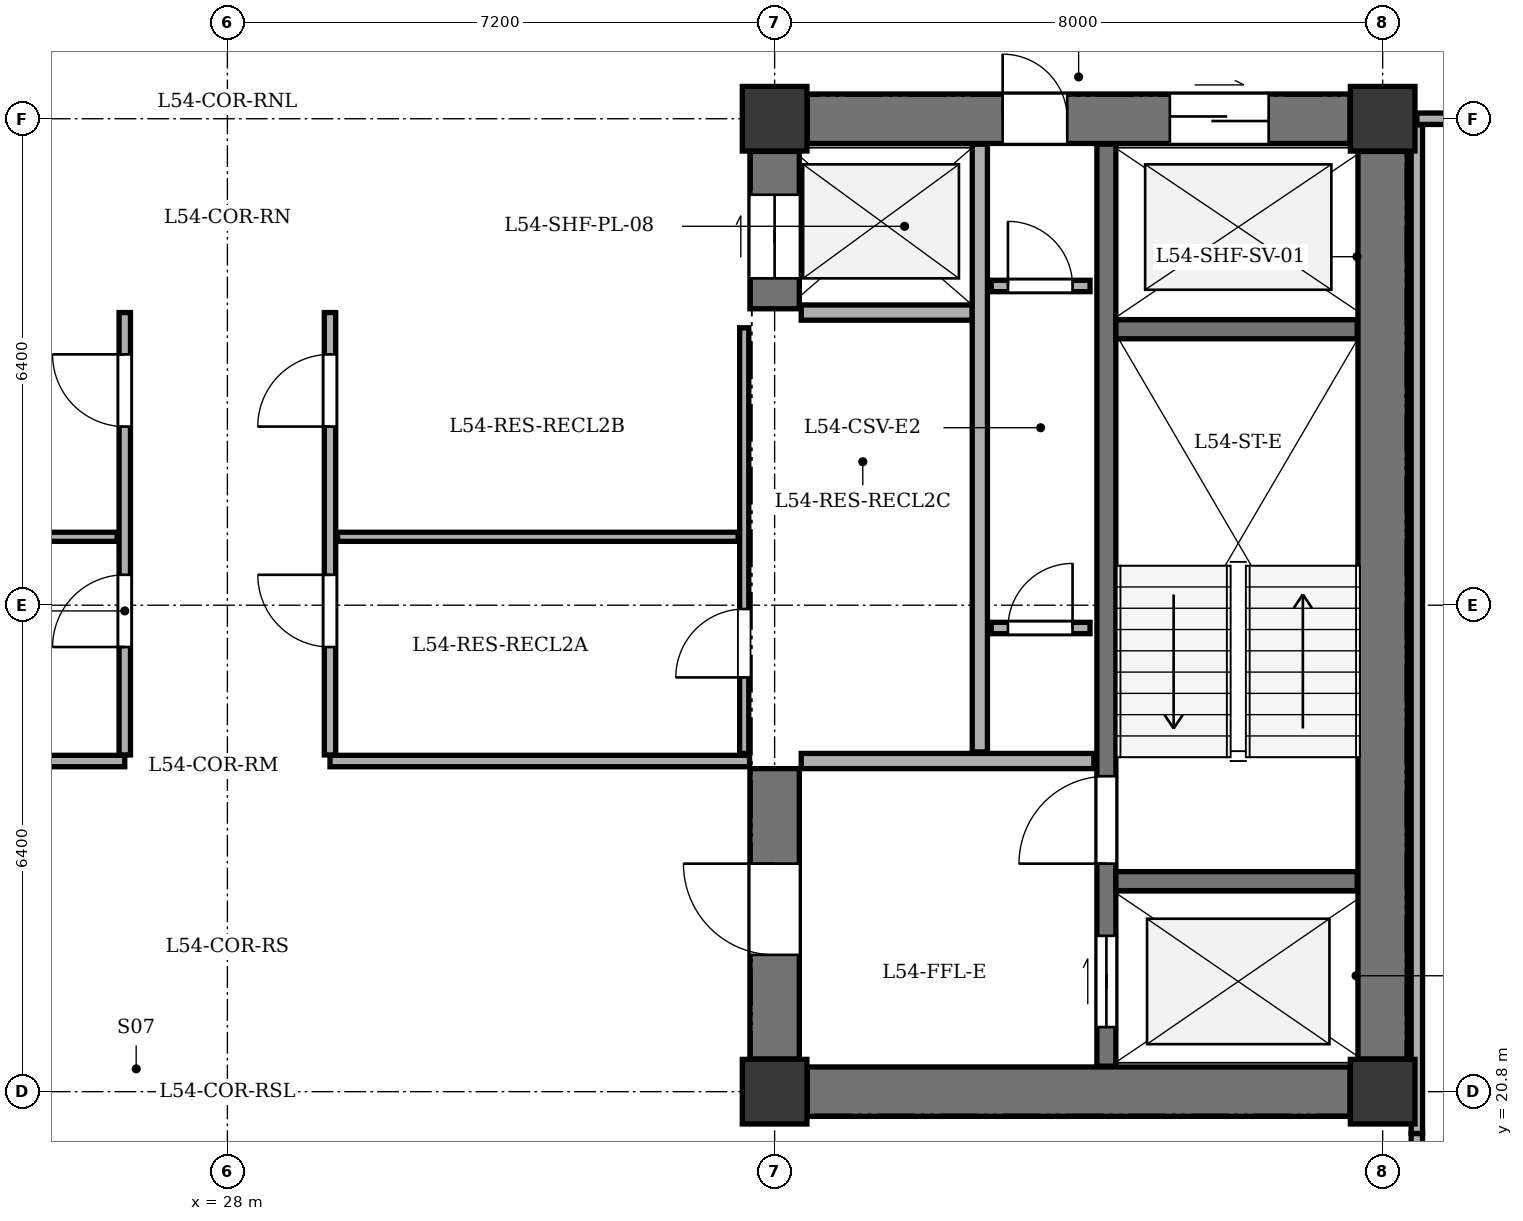
"""IFC4 building model, lengths in metres.
Left out: names, types, materials, properties, quantities, classifications, styles, units other than length and angle.
Written with IfcOpenShell. Run it as: python <this file> out.ifc"""

import sys

from ifc_helpers import new_model, si_unit, direction, frame, frame_2d, origin, origin_2d, place, context, subcontext, project, spatial, rectangle, extrude, element, fill, save


model = new_model("IFC4")
c1 = context("Model", 3, precision=1e-05, world=origin(), true_north=direction((0.0, 1.0)))
c2 = subcontext(c1, "Body", "Model", "MODEL_VIEW")
j1 = project(units=[si_unit("LENGTHUNIT", "METRE"), si_unit("PLANEANGLEUNIT", "RADIAN")], contexts=[c1])
p1 = place(None, origin())
s1 = spatial("IfcSite", under=j1, at=p1, CompositionType="ELEMENT")
p2 = place(p1, origin())
s2 = spatial("IfcBuilding", under=s1, at=p2, CompositionType="ELEMENT")
p3 = place(p2, frame((0.0, 0.0, 210.9)))
s3 = spatial("IfcBuildingStorey", under=s2, at=p3, CompositionType="ELEMENT", Elevation=210.9)
for number, where, z_axis, x_axis in (
    (1, (35.2, 20.8, 0.0), (0.0, 0.0, 1.0), (1.0, 0.0, 0.0)),
    (2, (43.2, 20.8, 0.0), (0.0, 0.0, 1.0), (1.0, 0.0, 0.0)),
    (3, (35.2, 33.6, 0.0), (0.0, 0.0, 1.0), (1.0, 0.0, 0.0)),
    (4, (43.2, 33.6, 0.0), (0.0, 0.0, 1.0), (1.0, 0.0, 0.0)),
):
    element("IfcColumn", number, at=place(p3, frame(where, z_axis=z_axis, x_axis=x_axis)), inside=s3, PredefinedType="COLUMN", context=c2, shape_type="SweptSolid", body=[
        extrude(rectangle(XDim=0.85, YDim=0.85, at=origin_2d()), origin(), (0.0, 0.0, 1.0), 3.4),
    ])
p4 = place(p3, frame((43.2, 21.23, 0.0), z_axis=(0.0, 0.0, 1.0), x_axis=(0.0, 1.0, 0.0)))
e5 = element("IfcWall", 5, at=p4, inside=s3, PredefinedType="SHEAR", context=c2, shape_type="SweptSolid", body=[
    extrude(rectangle(XDim=11.94, YDim=0.65, at=frame_2d((5.97, 0.0))), origin(), (0.0, 0.0, 1.0), 3.1),
])
p5 = place(p3, frame((35.63, 20.8, 0.0), z_axis=(0.0, 0.0, 1.0), x_axis=(1.0, 0.0, 0.0)))
e6 = element("IfcWall", 6, at=p5, inside=s3, PredefinedType="SHEAR", context=c2, shape_type="SweptSolid", body=[
    extrude(rectangle(XDim=7.14, YDim=0.65, at=frame_2d((3.57, 0.0))), origin(), (0.0, 0.0, 1.0), 3.1),
])
p6 = place(p3, frame((35.63, 33.6, 0.0), z_axis=(0.0, 0.0, 1.0), x_axis=(1.0, 0.0, 0.0)))
e7 = element("IfcWall", 7, at=p6, inside=s3, PredefinedType="SHEAR", context=c2, shape_type="SweptSolid", body=[
    extrude(rectangle(XDim=7.14, YDim=0.65, at=frame_2d((3.57, 0.0))), origin(), (0.0, 0.0, 1.0), 3.1),
])
p7 = place(p6, frame((4.77, 0.0, 0.0)))
e8 = element("IfcOpeningElement", 8, at=p7, cuts=e7, PredefinedType="OPENING", context=c2, shape_type="SweptSolid", body=[
    extrude(rectangle(XDim=1.3, YDim=2.15, at=frame_2d((0.65, 1.075))), frame((0.0, 0.335, 0.0), z_axis=(0.0, -1.0, 0.0), x_axis=(1.0, 0.0, 0.0)), (0.0, 0.0, 1.0), 0.67),
])
p8 = place(p6, frame((2.57, 0.0, 0.0)))
e9 = element("IfcOpeningElement", 9, at=p8, cuts=e7, PredefinedType="OPENING", context=c2, shape_type="SweptSolid", body=[
    extrude(rectangle(XDim=0.85, YDim=2.02, at=frame_2d((0.425, 1.01))), frame((0.0, 0.335, 0.0), z_axis=(0.0, -1.0, 0.0), x_axis=(1.0, 0.0, 0.0)), (0.0, 0.0, 1.0), 0.67),
])
p9 = place(p3, frame((35.2, 21.23, 0.0), z_axis=(0.0, 0.0, 1.0), x_axis=(0.0, 1.0, 0.0)))
e10 = element("IfcWall", 10, at=p9, inside=s3, PredefinedType="SHEAR", context=c2, shape_type="SweptSolid", body=[
    extrude(rectangle(XDim=3.82, YDim=0.65, at=frame_2d((1.91, 0.0))), origin(), (0.0, 0.0, 1.0), 3.1),
])
p10 = place(p9, frame((1.37, 0.0, 0.0)))
e11 = element("IfcOpeningElement", 11, at=p10, cuts=e10, PredefinedType="OPENING", context=c2, shape_type="SweptSolid", body=[
    extrude(rectangle(XDim=1.2, YDim=2.15, at=frame_2d((0.6, 1.075))), frame((0.0, 0.335, 0.0), z_axis=(0.0, -1.0, 0.0), x_axis=(1.0, 0.0, 0.0)), (0.0, 0.0, 1.0), 0.67),
])
p11 = place(p3, frame((35.2, 31.1, 0.0), z_axis=(0.0, 0.0, 1.0), x_axis=(0.0, 1.0, 0.0)))
e12 = element("IfcWall", 12, at=p11, inside=s3, PredefinedType="SHEAR", context=c2, shape_type="SweptSolid", body=[
    extrude(rectangle(XDim=2.07, YDim=0.65, at=frame_2d((1.035, 0.0))), origin(), (0.0, 0.0, 1.0), 3.1),
])
p12 = place(p11, frame((0.4, 0.0, 0.0)))
e13 = element("IfcOpeningElement", 13, at=p12, cuts=e12, PredefinedType="OPENING", context=c2, shape_type="SweptSolid", body=[
    extrude(rectangle(XDim=1.1, YDim=2.1, at=frame_2d((0.55, 1.05))), frame((0.0, 0.335, 0.0), z_axis=(0.0, -1.0, 0.0), x_axis=(1.0, 0.0, 0.0)), (0.0, 0.0, 1.0), 0.67),
])
p13 = place(p3, frame((39.565, 21.135, 0.0), z_axis=(0.0, 0.0, 1.0), x_axis=(0.0, 1.0, 0.0)))
e14 = element("IfcWall", 14, at=p13, inside=s3, PredefinedType="SHEAR", context=c2, shape_type="SweptSolid", body=[
    extrude(rectangle(XDim=12.13, YDim=0.25, at=frame_2d((6.065, 0.0))), origin(), (0.0, 0.0, 1.0), 3.1),
])
p14 = place(p13, frame((0.515, 0.0, 0.0)))
e15 = element("IfcOpeningElement", 15, at=p14, cuts=e14, PredefinedType="OPENING", context=c2, shape_type="SweptSolid", body=[
    extrude(rectangle(XDim=1.2, YDim=2.15, at=frame_2d((0.6, 1.075))), frame((0.0, 0.135, 0.0), z_axis=(0.0, -1.0, 0.0), x_axis=(1.0, 0.0, 0.0)), (0.0, 0.0, 1.0), 0.27),
])
p15 = place(p13, frame((2.665, 0.0, 0.0)))
e16 = element("IfcOpeningElement", 16, at=p15, cuts=e14, PredefinedType="OPENING", context=c2, shape_type="SweptSolid", body=[
    extrude(rectangle(XDim=1.15, YDim=2.15, at=frame_2d((0.575, 1.075))), frame((0.0, 0.135, 0.0), z_axis=(0.0, -1.0, 0.0), x_axis=(1.0, 0.0, 0.0)), (0.0, 0.0, 1.0), 0.27),
])
for number, where, z_axis, x_axis in (
    (17, (39.69, 23.57, 0.0), (0.0, 0.0, 1.0), (1.0, 0.0, 0.0)),
    (18, (39.69, 30.83, 0.0), (0.0, 0.0, 1.0), (1.0, 0.0, 0.0)),
):
    element("IfcWall", number, at=place(p3, frame(where, z_axis=z_axis, x_axis=x_axis)), inside=s3, PredefinedType="SHEAR", context=c2, shape_type="SweptSolid", body=[
        extrude(rectangle(XDim=3.175, YDim=0.25, at=frame_2d((1.587, 0.0))), origin(), (0.0, 0.0, 1.0), 3.1),
    ])
p16 = place(p3, frame((35.55, 25.15, 0.0), z_axis=(0.0, 0.0, 1.0), x_axis=(1.0, 0.0, 0.0)))
e19 = element("IfcWall", 19, at=p16, inside=s3, PredefinedType="SOLIDWALL", context=c2, shape_type="SweptSolid", body=[
    extrude(rectangle(XDim=3.85, YDim=0.2, at=frame_2d((1.925, 0.0))), origin(), (0.0, 0.0, 1.0), 3.1),
])
p17 = place(p3, frame((35.55, 31.05, 0.0), z_axis=(0.0, 0.0, 1.0), x_axis=(1.0, 0.0, 0.0)))
e20 = element("IfcWall", 20, at=p17, inside=s3, PredefinedType="SOLIDWALL", context=c2, shape_type="SweptSolid", body=[
    extrude(rectangle(XDim=2.25, YDim=0.2, at=frame_2d((1.125, 0.0))), origin(), (0.0, 0.0, 1.0), 3.1),
])
p18 = place(p3, frame((37.9, 25.27, 0.0), z_axis=(0.0, 0.0, 1.0), x_axis=(0.0, 1.0, 0.0)))
e21 = element("IfcWall", 21, at=p18, inside=s3, PredefinedType="SOLIDWALL", context=c2, shape_type="SweptSolid", body=[
    extrude(rectangle(XDim=7.995, YDim=0.2, at=frame_2d((3.998, 0.0))), origin(), (0.0, 0.0, 1.0), 3.1),
])
p19 = place(p3, frame((38.05, 26.9, 0.0), z_axis=(0.0, 0.0, 1.0), x_axis=(1.0, 0.0, 0.0)))
e22 = element("IfcWall", 22, at=p19, inside=s3, PredefinedType="PARTITIONING", context=c2, shape_type="SweptSolid", body=[
    extrude(rectangle(XDim=1.3, YDim=0.15, at=frame_2d((0.65, 0.0))), origin(), (0.0, 0.0, 1.0), 3.1),
])
p20 = place(p19, frame((0.22, 0.0, 0.0)))
e23 = element("IfcOpeningElement", 23, at=p20, cuts=e22, PredefinedType="OPENING", context=c2, shape_type="SweptSolid", body=[
    extrude(rectangle(XDim=0.85, YDim=2.02, at=frame_2d((0.425, 1.01))), frame((0.0, 0.085, 0.0), z_axis=(0.0, -1.0, 0.0), x_axis=(1.0, 0.0, 0.0)), (0.0, 0.0, 1.0), 0.17),
])
p21 = place(p3, frame((38.05, 31.4, 0.0), z_axis=(0.0, 0.0, 1.0), x_axis=(1.0, 0.0, 0.0)))
e24 = element("IfcWall", 24, at=p21, inside=s3, PredefinedType="PARTITIONING", context=c2, shape_type="SweptSolid", body=[
    extrude(rectangle(XDim=1.3, YDim=0.15, at=frame_2d((0.65, 0.0))), origin(), (0.0, 0.0, 1.0), 3.1),
])
p22 = place(p21, frame((0.22, 0.0, 0.0)))
e25 = element("IfcOpeningElement", 25, at=p22, cuts=e24, PredefinedType="OPENING", context=c2, shape_type="SweptSolid", body=[
    extrude(rectangle(XDim=0.85, YDim=2.02, at=frame_2d((0.425, 1.01))), frame((0.0, 0.085, 0.0), z_axis=(0.0, -1.0, 0.0), x_axis=(1.0, 0.0, 0.0)), (0.0, 0.0, 1.0), 0.17),
])
for number, where, z_axis, x_axis in (
    (26, (21.13, 25.15, 0.0), (0.0, 0.0, 1.0), (1.0, 0.0, 0.0)),
    (27, (29.35, 25.15, 0.0), (0.0, 0.0, 1.0), (1.0, 0.0, 0.0)),
):
    element("IfcWall", number, at=place(p3, frame(where, z_axis=z_axis, x_axis=x_axis)), inside=s3, PredefinedType="PARTITIONING", context=c2, shape_type="SweptSolid", body=[
        extrude(rectangle(XDim=5.52, YDim=0.15, at=frame_2d((2.76, 0.0))), origin(), (0.0, 0.0, 1.0), 3.1),
    ])
p23 = place(p3, frame((26.65, 25.23, 0.0), z_axis=(0.0, 0.0, 1.0), x_axis=(0.0, 1.0, 0.0)))
e28 = element("IfcWall", 28, at=p23, inside=s3, PredefinedType="PARTITIONING", context=c2, shape_type="SweptSolid", body=[
    extrude(rectangle(XDim=5.82, YDim=0.15, at=frame_2d((2.91, 0.0))), origin(), (0.0, 0.0, 1.0), 3.1),
])
p24 = place(p23, frame((1.42, 0.0, 0.0)))
e29 = element("IfcOpeningElement", 29, at=p24, cuts=e28, PredefinedType="OPENING", context=c2, shape_type="SweptSolid", body=[
    extrude(rectangle(XDim=0.95, YDim=2.1, at=frame_2d((0.475, 1.05))), frame((0.0, 0.085, 0.0), z_axis=(0.0, -1.0, 0.0), x_axis=(1.0, 0.0, 0.0)), (0.0, 0.0, 1.0), 0.17),
])
p25 = place(p23, frame((4.32, 0.0, 0.0)))
e30 = element("IfcOpeningElement", 30, at=p25, cuts=e28, PredefinedType="OPENING", context=c2, shape_type="SweptSolid", body=[
    extrude(rectangle(XDim=0.95, YDim=2.1, at=frame_2d((0.475, 1.05))), frame((0.0, 0.085, 0.0), z_axis=(0.0, -1.0, 0.0), x_axis=(1.0, 0.0, 0.0)), (0.0, 0.0, 1.0), 0.17),
])
p26 = place(p3, frame((20.28, 28.1, 0.0), z_axis=(0.0, 0.0, 1.0), x_axis=(1.0, 0.0, 0.0)))
e31 = element("IfcWall", 31, at=p26, inside=s3, PredefinedType="PARTITIONING", context=c2, shape_type="SweptSolid", body=[
    extrude(rectangle(XDim=6.27, YDim=0.12, at=frame_2d((3.135, 0.0))), origin(), (0.0, 0.0, 1.0), 3.1),
])
p27 = place(p3, frame((29.35, 25.23, 0.0), z_axis=(0.0, 0.0, 1.0), x_axis=(0.0, 1.0, 0.0)))
e32 = element("IfcWall", 32, at=p27, inside=s3, PredefinedType="PARTITIONING", context=c2, shape_type="SweptSolid", body=[
    extrude(rectangle(XDim=5.82, YDim=0.15, at=frame_2d((2.91, 0.0))), origin(), (0.0, 0.0, 1.0), 3.1),
])
p28 = place(p27, frame((1.42, 0.0, 0.0)))
e33 = element("IfcOpeningElement", 33, at=p28, cuts=e32, PredefinedType="OPENING", context=c2, shape_type="SweptSolid", body=[
    extrude(rectangle(XDim=0.95, YDim=2.1, at=frame_2d((0.475, 1.05))), frame((0.0, 0.085, 0.0), z_axis=(0.0, -1.0, 0.0), x_axis=(1.0, 0.0, 0.0)), (0.0, 0.0, 1.0), 0.17),
])
p29 = place(p27, frame((4.32, 0.0, 0.0)))
e34 = element("IfcOpeningElement", 34, at=p29, cuts=e32, PredefinedType="OPENING", context=c2, shape_type="SweptSolid", body=[
    extrude(rectangle(XDim=0.95, YDim=2.1, at=frame_2d((0.475, 1.05))), frame((0.0, 0.085, 0.0), z_axis=(0.0, -1.0, 0.0), x_axis=(1.0, 0.0, 0.0)), (0.0, 0.0, 1.0), 0.17),
])
p30 = place(p3, frame((34.8, 25.25, 0.0), z_axis=(0.0, 0.0, 1.0), x_axis=(0.0, 1.0, 0.0)))
e35 = element("IfcWall", 35, at=p30, inside=s3, PredefinedType="PARTITIONING", context=c2, shape_type="SweptSolid", body=[
    extrude(rectangle(XDim=5.6, YDim=0.12, at=frame_2d((2.8, 0.0))), origin(), (0.0, 0.0, 1.0), 3.1),
])
p31 = place(p30, frame((1.0, 0.0, 0.0)))
e36 = element("IfcOpeningElement", 36, at=p31, cuts=e35, PredefinedType="OPENING", context=c2, shape_type="SweptSolid", body=[
    extrude(rectangle(XDim=0.9, YDim=2.05, at=frame_2d((0.45, 1.025))), frame((0.0, 0.07, 0.0), z_axis=(0.0, -1.0, 0.0), x_axis=(1.0, 0.0, 0.0)), (0.0, 0.0, 1.0), 0.14),
])
p32 = place(p3, frame((29.45, 28.1, 0.0), z_axis=(0.0, 0.0, 1.0), x_axis=(1.0, 0.0, 0.0)))
e37 = element("IfcWall", 37, at=p32, inside=s3, PredefinedType="PARTITIONING", context=c2, shape_type="SweptSolid", body=[
    extrude(rectangle(XDim=5.27, YDim=0.12, at=frame_2d((2.635, 0.0))), origin(), (0.0, 0.0, 1.0), 3.1),
])
p33 = place(p3, frame((43.65, 33.6, 0.0), z_axis=(0.0, 0.0, 1.0), x_axis=(1.0, 0.0, 0.0)))
e38 = element("IfcWall", 38, at=p33, inside=s3, PredefinedType="PARTITIONING", context=c2, shape_type="SweptSolid", body=[
    extrude(rectangle(XDim=5.305, YDim=0.15, at=frame_2d((2.653, 0.0))), origin(), (0.0, 0.0, 1.0), 2.535),
])
p34 = place(p3, frame((43.65, 18.46, 0.0), z_axis=(0.0, 0.0, 1.0), x_axis=(0.0, 1.0, 0.0)))
e39 = element("IfcWall", 39, at=p34, inside=s3, PredefinedType="PARTITIONING", context=c2, shape_type="SweptSolid", body=[
    extrude(rectangle(XDim=1.79, YDim=0.15, at=frame_2d((0.895, 0.0))), origin(), (0.0, 0.0, 1.0), 3.1),
])
p35 = place(p34, frame((0.38, 0.0, 0.0)))
e40 = element("IfcOpeningElement", 40, at=p35, cuts=e39, PredefinedType="OPENING", context=c2, shape_type="SweptSolid", body=[
    extrude(rectangle(XDim=0.95, YDim=2.1, at=frame_2d((0.475, 1.05))), frame((0.0, 0.085, 0.0), z_axis=(0.0, -1.0, 0.0), x_axis=(1.0, 0.0, 0.0)), (0.0, 0.0, 1.0), 0.17),
])
p36 = place(p3, frame((43.65, 20.25, 0.0), z_axis=(0.0, 0.0, 1.0), x_axis=(0.0, 1.0, 0.0)))
e41 = element("IfcWall", 41, at=p36, inside=s3, PredefinedType="PARTITIONING", context=c2, shape_type="SweptSolid", body=[
    extrude(rectangle(XDim=13.27, YDim=0.15, at=frame_2d((6.635, 0.0))), origin(), (0.0, 0.0, 1.0), 3.1),
])
p37 = place(p7, origin())
e42 = element("IfcDoor", 42, at=p37, inside=s3, OperationType="DOUBLE_DOOR_SLIDING", PredefinedType="DOOR", context=c2, shape_type="SweptSolid", body=[
    extrude(rectangle(XDim=1.3, YDim=2.15, at=frame_2d((0.65, 1.075))), frame((0.0, 0.025, 0.0), z_axis=(0.0, -1.0, 0.0), x_axis=(1.0, 0.0, 0.0)), (0.0, 0.0, 1.0), 0.05),
])
fill(e8, e42)
p38 = place(p8, origin())
e43 = element("IfcDoor", 43, at=p38, inside=s3, OperationType="SINGLE_SWING_LEFT", PredefinedType="DOOR", context=c2, shape_type="SweptSolid", body=[
    extrude(rectangle(XDim=0.85, YDim=2.02, at=frame_2d((0.425, 1.01))), frame((0.0, 0.025, 0.0), z_axis=(0.0, -1.0, 0.0), x_axis=(1.0, 0.0, 0.0)), (0.0, 0.0, 1.0), 0.05),
])
fill(e9, e43)
p39 = place(p10, origin())
e44 = element("IfcDoor", 44, at=p39, inside=s3, OperationType="SINGLE_SWING_RIGHT", PredefinedType="DOOR", context=c2, shape_type="SweptSolid", body=[
    extrude(rectangle(XDim=1.2, YDim=2.15, at=frame_2d((0.6, 1.075))), frame((0.0, 0.025, 0.0), z_axis=(0.0, -1.0, 0.0), x_axis=(1.0, 0.0, 0.0)), (0.0, 0.0, 1.0), 0.05),
])
fill(e11, e44)
p40 = place(p12, origin())
e45 = element("IfcDoor", 45, at=p40, inside=s3, OperationType="DOUBLE_DOOR_SLIDING", PredefinedType="DOOR", context=c2, shape_type="SweptSolid", body=[
    extrude(rectangle(XDim=1.1, YDim=2.1, at=frame_2d((0.55, 1.05))), frame((0.0, 0.025, 0.0), z_axis=(0.0, -1.0, 0.0), x_axis=(1.0, 0.0, 0.0)), (0.0, 0.0, 1.0), 0.05),
])
fill(e13, e45)
p41 = place(p14, origin())
e46 = element("IfcDoor", 46, at=p41, inside=s3, OperationType="DOUBLE_DOOR_SLIDING", PredefinedType="DOOR", context=c2, shape_type="SweptSolid", body=[
    extrude(rectangle(XDim=1.2, YDim=2.15, at=frame_2d((0.6, 1.075))), frame((0.0, 0.025, 0.0), z_axis=(0.0, -1.0, 0.0), x_axis=(1.0, 0.0, 0.0)), (0.0, 0.0, 1.0), 0.05),
])
fill(e15, e46)
p42 = place(p15, origin())
e47 = element("IfcDoor", 47, at=p42, inside=s3, OperationType="SINGLE_SWING_LEFT", PredefinedType="DOOR", context=c2, shape_type="SweptSolid", body=[
    extrude(rectangle(XDim=1.15, YDim=2.15, at=frame_2d((0.575, 1.075))), frame((0.0, 0.025, 0.0), z_axis=(0.0, -1.0, 0.0), x_axis=(1.0, 0.0, 0.0)), (0.0, 0.0, 1.0), 0.05),
])
fill(e16, e47)
p43 = place(p20, origin())
e48 = element("IfcDoor", 48, at=p43, inside=s3, OperationType="SINGLE_SWING_RIGHT", PredefinedType="DOOR", context=c2, shape_type="SweptSolid", body=[
    extrude(rectangle(XDim=0.85, YDim=2.02, at=frame_2d((0.425, 1.01))), frame((0.0, 0.025, 0.0), z_axis=(0.0, -1.0, 0.0), x_axis=(1.0, 0.0, 0.0)), (0.0, 0.0, 1.0), 0.05),
])
fill(e23, e48)
p44 = place(p22, origin())
e49 = element("IfcDoor", 49, at=p44, inside=s3, OperationType="SINGLE_SWING_LEFT", PredefinedType="DOOR", context=c2, shape_type="SweptSolid", body=[
    extrude(rectangle(XDim=0.85, YDim=2.02, at=frame_2d((0.425, 1.01))), frame((0.0, 0.025, 0.0), z_axis=(0.0, -1.0, 0.0), x_axis=(1.0, 0.0, 0.0)), (0.0, 0.0, 1.0), 0.05),
])
fill(e25, e49)
p45 = place(p24, origin())
e50 = element("IfcDoor", 50, at=p45, inside=s3, OperationType="SINGLE_SWING_LEFT", PredefinedType="DOOR", context=c2, shape_type="SweptSolid", body=[
    extrude(rectangle(XDim=0.95, YDim=2.1, at=frame_2d((0.475, 1.05))), frame((0.0, 0.025, 0.0), z_axis=(0.0, -1.0, 0.0), x_axis=(1.0, 0.0, 0.0)), (0.0, 0.0, 1.0), 0.05),
])
fill(e29, e50)
p46 = place(p25, origin())
e51 = element("IfcDoor", 51, at=p46, inside=s3, OperationType="SINGLE_SWING_RIGHT", PredefinedType="DOOR", context=c2, shape_type="SweptSolid", body=[
    extrude(rectangle(XDim=0.95, YDim=2.1, at=frame_2d((0.475, 1.05))), frame((0.0, 0.025, 0.0), z_axis=(0.0, -1.0, 0.0), x_axis=(1.0, 0.0, 0.0)), (0.0, 0.0, 1.0), 0.05),
])
fill(e30, e51)
p47 = place(p31, origin())
e52 = element("IfcDoor", 52, at=p47, inside=s3, OperationType="SINGLE_SWING_LEFT", PredefinedType="DOOR", context=c2, shape_type="SweptSolid", body=[
    extrude(rectangle(XDim=0.9, YDim=2.05, at=frame_2d((0.45, 1.025))), frame((0.0, 0.025, 0.0), z_axis=(0.0, -1.0, 0.0), x_axis=(1.0, 0.0, 0.0)), (0.0, 0.0, 1.0), 0.05),
])
fill(e36, e52)
p48 = place(p28, origin())
e53 = element("IfcDoor", 53, at=p48, inside=s3, OperationType="SINGLE_SWING_RIGHT", PredefinedType="DOOR", context=c2, shape_type="SweptSolid", body=[
    extrude(rectangle(XDim=0.95, YDim=2.1, at=frame_2d((0.475, 1.05))), frame((0.0, 0.025, 0.0), z_axis=(0.0, -1.0, 0.0), x_axis=(1.0, 0.0, 0.0)), (0.0, 0.0, 1.0), 0.05),
])
fill(e33, e53)
p49 = place(p29, origin())
e54 = element("IfcDoor", 54, at=p49, inside=s3, OperationType="SINGLE_SWING_LEFT", PredefinedType="DOOR", context=c2, shape_type="SweptSolid", body=[
    extrude(rectangle(XDim=0.95, YDim=2.1, at=frame_2d((0.475, 1.05))), frame((0.0, 0.025, 0.0), z_axis=(0.0, -1.0, 0.0), x_axis=(1.0, 0.0, 0.0)), (0.0, 0.0, 1.0), 0.05),
])
fill(e34, e54)
save(model, sys.argv[1])
